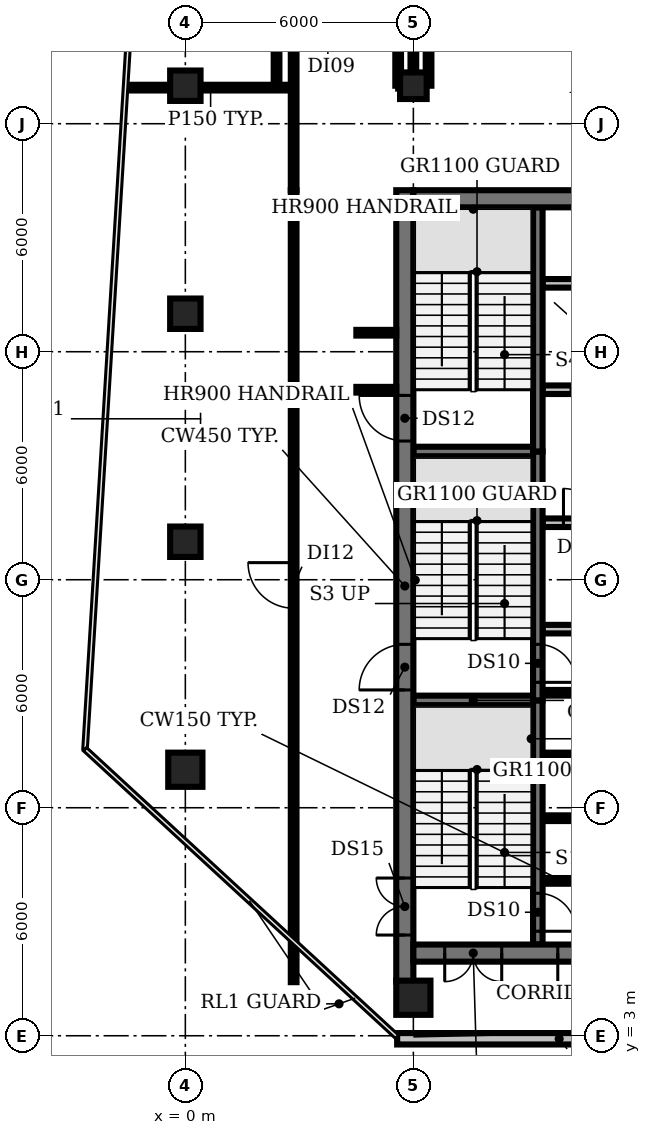
"""IFC4 building model, lengths in metres.
Left out: names, types, materials, properties, quantities, classifications, styles, units other than length and angle.
Written with IfcOpenShell. Run it as: python <this file> out.ifc"""

import sys

from ifc_helpers import new_model, si_unit, direction, frame, frame_2d, origin, origin_2d, place, context, subcontext, project, spatial, rectangle, circle, extrude, element, fill, save


model = new_model("IFC4")
c1 = context("Model", 3, precision=1e-05, world=origin(), true_north=direction((0.0, 1.0)))
c2 = subcontext(c1, "Body", "Model", "MODEL_VIEW")
j1 = project(units=[si_unit("LENGTHUNIT", "METRE"), si_unit("PLANEANGLEUNIT", "RADIAN")], contexts=[c1])
p1 = place(None, origin())
s1 = spatial("IfcSite", under=j1, at=p1, CompositionType="ELEMENT")
p2 = place(p1, origin())
s2 = spatial("IfcBuilding", under=s1, at=p2, CompositionType="ELEMENT")
p3 = place(p2, frame((0.0, 0.0, 243.2)))
s3 = spatial("IfcBuildingStorey", under=s2, at=p3, CompositionType="ELEMENT", Elevation=243.2)
p4 = place(p3, frame((0.0, 10.0, 0.0), z_axis=(0.0, 0.0, 1.0), x_axis=(1.0, 0.0, 0.0)))
e1 = element("IfcColumn", 1, at=p4, inside=s3, PredefinedType="COLUMN", context=c2, shape_type="SweptSolid", body=[
    extrude(circle(Radius=0.45, at=origin_2d()), origin(), (0.0, 0.0, 1.0), 3.85),
])
for number, where, z_axis, x_axis in (
    (2, (0.0, 16.0, 0.0), (0.0, 0.0, 1.0), (1.0, 0.0, 0.0)),
    (3, (0.0, 22.0, 0.0), (0.0, 0.0, 1.0), (1.0, 0.0, 0.0)),
    (4, (0.0, 28.0, 0.0), (0.0, 0.0, 1.0), (1.0, 0.0, 0.0)),
):
    element("IfcColumn", number, at=place(p3, frame(where, z_axis=z_axis, x_axis=x_axis)), inside=s3, PredefinedType="COLUMN", context=c2, shape_type="SweptSolid", body=[
        extrude(rectangle(XDim=0.8, YDim=0.8, at=origin_2d()), origin(), (0.0, 0.0, 1.0), 3.85),
    ])
p5 = place(p3, frame((6.0, 4.0, 0.0), z_axis=(0.0, 0.0, 1.0), x_axis=(1.0, 0.0, 0.0)))
e5 = element("IfcColumn", 5, at=p5, inside=s3, PredefinedType="COLUMN", context=c2, shape_type="SweptSolid", body=[
    extrude(circle(Radius=0.45, at=origin_2d()), origin(), (0.0, 0.0, 1.0), 3.85),
])
p6 = place(p3, frame((6.0, 28.0, 0.0), z_axis=(0.0, 0.0, 1.0), x_axis=(1.0, 0.0, 0.0)))
e6 = element("IfcColumn", 6, at=p6, inside=s3, PredefinedType="COLUMN", context=c2, shape_type="SweptSolid", body=[
    extrude(rectangle(XDim=0.7, YDim=0.7, at=origin_2d()), origin(), (0.0, 0.0, 1.0), 3.85),
])
p7 = place(p3, frame((5.573, 2.92, 0.0), z_axis=(0.0, 0.0, 1.0), x_axis=(1.0, 0.0, 0.0)))
e7 = element("IfcWall", 7, at=p7, inside=s3, PredefinedType="SOLIDWALL", context=c2, shape_type="SweptSolid", body=[
    extrude(rectangle(XDim=8.527, YDim=0.3, at=frame_2d((4.263, 0.0))), origin(), (0.0, 0.0, 1.0), 3.85),
])
for number, where, z_axis, x_axis in (
    (8, (9.4, 7.075, 0.0), (0.0, 0.0, 1.0), (1.0, 0.0, 0.0)),
    (9, (9.4, 8.725, 0.0), (0.0, 0.0, 1.0), (1.0, 0.0, 0.0)),
    (10, (9.4, 10.375, 0.0), (0.0, 0.0, 1.0), (1.0, 0.0, 0.0)),
):
    element("IfcWall", number, at=place(p3, frame(where, z_axis=z_axis, x_axis=x_axis)), inside=s3, PredefinedType="SHEAR", context=c2, shape_type="SweptSolid", body=[
        extrude(rectangle(XDim=1.05, YDim=0.15, at=frame_2d((0.525, 0.0))), origin(), (0.0, 0.0, 1.0), 3.85),
    ])
p8 = place(p3, frame((6.0, 11.825, 0.0), z_axis=(0.0, 0.0, 1.0), x_axis=(1.0, 0.0, 0.0)))
e11 = element("IfcWall", 11, at=p8, inside=s3, PredefinedType="SHEAR", context=c2, shape_type="SweptSolid", body=[
    extrude(rectangle(XDim=3.15, YDim=0.25, at=frame_2d((1.575, 0.0))), origin(), (0.0, 0.0, 1.0), 3.85),
])
p9 = place(p3, frame((9.4, 12.025, 0.0), z_axis=(0.0, 0.0, 1.0), x_axis=(1.0, 0.0, 0.0)))
e12 = element("IfcWall", 12, at=p9, inside=s3, PredefinedType="SHEAR", context=c2, shape_type="SweptSolid", body=[
    extrude(rectangle(XDim=1.05, YDim=0.15, at=frame_2d((0.525, 0.0))), origin(), (0.0, 0.0, 1.0), 3.85),
])
p10 = place(p3, frame((9.4, 13.7, 0.0), z_axis=(0.0, 0.0, 1.0), x_axis=(1.0, 0.0, 0.0)))
e13 = element("IfcWall", 13, at=p10, inside=s3, PredefinedType="PARTITIONING", context=c2, shape_type="SweptSolid", body=[
    extrude(rectangle(XDim=4.0, YDim=0.225, at=frame_2d((2.0, 0.0))), origin(), (0.0, 0.0, 1.0), 3.85),
])
p11 = place(p3, frame((9.4, 16.5, 0.0), z_axis=(0.0, 0.0, 1.0), x_axis=(1.0, 0.0, 0.0)))
e14 = element("IfcWall", 14, at=p11, inside=s3, PredefinedType="PARTITIONING", context=c2, shape_type="SweptSolid", body=[
    extrude(rectangle(XDim=14.6, YDim=0.225, at=frame_2d((7.3, 0.0))), origin(), (0.0, 0.0, 1.0), 3.85),
])
p12 = place(p11, frame((0.55, 0.0, 0.0)))
e15 = element("IfcOpeningElement", 15, at=p12, cuts=e14, PredefinedType="OPENING", context=c2, shape_type="SweptSolid", body=[
    extrude(rectangle(XDim=0.9, YDim=2.1, at=frame_2d((0.45, 1.05))), frame((0.0, 0.123, 0.0), z_axis=(0.0, -1.0, 0.0), x_axis=(1.0, 0.0, 0.0)), (0.0, 0.0, 1.0), 0.245),
])
p13 = place(p11, frame((6.075, 0.0, 0.0)))
e16 = element("IfcOpeningElement", 16, at=p13, cuts=e14, PredefinedType="OPENING", context=c2, shape_type="SweptSolid", body=[
    extrude(rectangle(XDim=1.0, YDim=2.1, at=frame_2d((0.5, 1.05))), frame((0.0, 0.123, 0.0), z_axis=(0.0, -1.0, 0.0), x_axis=(1.0, 0.0, 0.0)), (0.0, 0.0, 1.0), 0.245),
])
p14 = place(p11, frame((11.647, 0.0, 0.0)))
e17 = element("IfcOpeningElement", 17, at=p14, cuts=e14, PredefinedType="OPENING", context=c2, shape_type="SweptSolid", body=[
    extrude(rectangle(XDim=0.9, YDim=2.1, at=frame_2d((0.45, 1.05))), frame((0.0, 0.123, 0.0), z_axis=(0.0, -1.0, 0.0), x_axis=(1.0, 0.0, 0.0)), (0.0, 0.0, 1.0), 0.245),
])
p15 = place(p11, frame((13.423, 0.0, 0.0)))
e18 = element("IfcOpeningElement", 18, at=p15, cuts=e14, PredefinedType="OPENING", context=c2, shape_type="SweptSolid", body=[
    extrude(rectangle(XDim=0.9, YDim=2.1, at=frame_2d((0.45, 1.05))), frame((0.0, 0.123, 0.0), z_axis=(0.0, -1.0, 0.0), x_axis=(1.0, 0.0, 0.0)), (0.0, 0.0, 1.0), 0.245),
])
p16 = place(p3, frame((6.0, 18.375, 0.0), z_axis=(0.0, 0.0, 1.0), x_axis=(1.0, 0.0, 0.0)))
e19 = element("IfcWall", 19, at=p16, inside=s3, PredefinedType="SHEAR", context=c2, shape_type="SweptSolid", body=[
    extrude(rectangle(XDim=3.15, YDim=0.25, at=frame_2d((1.575, 0.0))), origin(), (0.0, 0.0, 1.0), 3.85),
])
p17 = place(p3, frame((24.0, 20.0, 0.0), z_axis=(0.0, 0.0, 1.0), x_axis=(-1.0, 0.0, 0.0)))
e20 = element("IfcWall", 20, at=p17, inside=s3, PredefinedType="PARTITIONING", context=c2, shape_type="SweptSolid", body=[
    extrude(rectangle(XDim=14.6, YDim=0.225, at=frame_2d((7.3, 0.0))), origin(), (0.0, 0.0, 1.0), 3.85),
])
p18 = place(p17, frame((12.75, 0.0, 0.0)))
e21 = element("IfcOpeningElement", 21, at=p18, cuts=e20, PredefinedType="OPENING", context=c2, shape_type="SweptSolid", body=[
    extrude(rectangle(XDim=1.1, YDim=2.1, at=frame_2d((0.55, 1.05))), frame((0.0, 0.123, 0.0), z_axis=(0.0, -1.0, 0.0), x_axis=(1.0, 0.0, 0.0)), (0.0, 0.0, 1.0), 0.245),
])
p19 = place(p17, frame((9.95, 0.0, 0.0)))
e22 = element("IfcOpeningElement", 22, at=p19, cuts=e20, PredefinedType="OPENING", context=c2, shape_type="SweptSolid", body=[
    extrude(rectangle(XDim=1.1, YDim=2.1, at=frame_2d((0.55, 1.05))), frame((0.0, 0.123, 0.0), z_axis=(0.0, -1.0, 0.0), x_axis=(1.0, 0.0, 0.0)), (0.0, 0.0, 1.0), 0.245),
])
p20 = place(p17, frame((7.15, 0.0, 0.0)))
e23 = element("IfcOpeningElement", 23, at=p20, cuts=e20, PredefinedType="OPENING", context=c2, shape_type="SweptSolid", body=[
    extrude(rectangle(XDim=1.1, YDim=2.1, at=frame_2d((0.55, 1.05))), frame((0.0, 0.123, 0.0), z_axis=(0.0, -1.0, 0.0), x_axis=(1.0, 0.0, 0.0)), (0.0, 0.0, 1.0), 0.245),
])
p21 = place(p17, frame((4.35, 0.0, 0.0)))
e24 = element("IfcOpeningElement", 24, at=p21, cuts=e20, PredefinedType="OPENING", context=c2, shape_type="SweptSolid", body=[
    extrude(rectangle(XDim=1.1, YDim=2.1, at=frame_2d((0.55, 1.05))), frame((0.0, 0.123, 0.0), z_axis=(0.0, -1.0, 0.0), x_axis=(1.0, 0.0, 0.0)), (0.0, 0.0, 1.0), 0.245),
])
p22 = place(p17, frame((2.137, 0.0, 0.0)))
e25 = element("IfcOpeningElement", 25, at=p22, cuts=e20, PredefinedType="OPENING", context=c2, shape_type="SweptSolid", body=[
    extrude(rectangle(XDim=0.9, YDim=2.1, at=frame_2d((0.45, 1.05))), frame((0.0, 0.123, 0.0), z_axis=(0.0, -1.0, 0.0), x_axis=(1.0, 0.0, 0.0)), (0.0, 0.0, 1.0), 0.245),
])
p23 = place(p17, frame((0.363, 0.0, 0.0)))
e26 = element("IfcOpeningElement", 26, at=p23, cuts=e20, PredefinedType="OPENING", context=c2, shape_type="SweptSolid", body=[
    extrude(rectangle(XDim=0.9, YDim=2.1, at=frame_2d((0.45, 1.05))), frame((0.0, 0.123, 0.0), z_axis=(0.0, -1.0, 0.0), x_axis=(1.0, 0.0, 0.0)), (0.0, 0.0, 1.0), 0.245),
])
p24 = place(p3, frame((9.4, 22.8, 0.0), z_axis=(0.0, 0.0, 1.0), x_axis=(1.0, 0.0, 0.0)))
e27 = element("IfcWall", 27, at=p24, inside=s3, PredefinedType="PARTITIONING", context=c2, shape_type="SweptSolid", body=[
    extrude(rectangle(XDim=14.6, YDim=0.225, at=frame_2d((7.3, 0.0))), origin(), (0.0, 0.0, 1.0), 3.85),
])
p25 = place(p3, frame((9.275, 11.825, 0.0), z_axis=(0.0, 0.0, 1.0), x_axis=(0.0, -1.0, 0.0)))
e28 = element("IfcWall", 28, at=p25, inside=s3, PredefinedType="SHEAR", context=c2, shape_type="SweptSolid", body=[
    extrude(rectangle(XDim=6.425, YDim=0.25, at=frame_2d((3.212, 0.0))), origin(), (0.0, 0.0, 1.0), 3.85),
])
p26 = place(p25, frame((5.075, 0.0, 0.0)))
e29 = element("IfcOpeningElement", 29, at=p26, cuts=e28, PredefinedType="OPENING", context=c2, shape_type="SweptSolid", body=[
    extrude(rectangle(XDim=1.0, YDim=2.1, at=frame_2d((0.5, 1.05))), frame((0.0, 0.135, 0.0), z_axis=(0.0, -1.0, 0.0), x_axis=(1.0, 0.0, 0.0)), (0.0, 0.0, 1.0), 0.27),
])
p27 = place(p3, frame((9.275, 18.375, 0.0), z_axis=(0.0, 0.0, 1.0), x_axis=(0.0, -1.0, 0.0)))
e30 = element("IfcWall", 30, at=p27, inside=s3, PredefinedType="SHEAR", context=c2, shape_type="SweptSolid", body=[
    extrude(rectangle(XDim=6.55, YDim=0.25, at=frame_2d((3.275, 0.0))), origin(), (0.0, 0.0, 1.0), 3.85),
])
p28 = place(p27, frame((5.075, 0.0, 0.0)))
e31 = element("IfcOpeningElement", 31, at=p28, cuts=e30, PredefinedType="OPENING", context=c2, shape_type="SweptSolid", body=[
    extrude(rectangle(XDim=1.0, YDim=2.1, at=frame_2d((0.5, 1.05))), frame((0.0, 0.135, 0.0), z_axis=(0.0, -1.0, 0.0), x_axis=(1.0, 0.0, 0.0)), (0.0, 0.0, 1.0), 0.27),
])
p29 = place(p3, frame((9.275, 18.375, 0.0), z_axis=(0.0, 0.0, 1.0), x_axis=(0.0, 1.0, 0.0)))
e32 = element("IfcWall", 32, at=p29, inside=s3, PredefinedType="SHEAR", context=c2, shape_type="SweptSolid", body=[
    extrude(rectangle(XDim=6.425, YDim=0.25, at=frame_2d((3.212, 0.0))), origin(), (0.0, 0.0, 1.0), 3.85),
])
p30 = place(p3, frame((5.775, 4.42, 0.0), z_axis=(0.0, 0.0, 1.0), x_axis=(0.0, 1.0, 0.0)))
e33 = element("IfcWall", 33, at=p30, inside=s3, PredefinedType="SHEAR", context=c2, shape_type="SweptSolid", body=[
    extrude(rectangle(XDim=20.83, YDim=0.45, at=frame_2d((10.415, 0.0))), origin(), (0.0, 0.0, 1.0), 3.85),
])
p31 = place(p30, frame((1.23, 0.0, 0.0)))
e34 = element("IfcOpeningElement", 34, at=p31, cuts=e33, PredefinedType="OPENING", context=c2, shape_type="SweptSolid", body=[
    extrude(rectangle(XDim=1.5, YDim=2.1, at=frame_2d((0.75, 1.05))), frame((0.0, 0.235, 0.0), z_axis=(0.0, -1.0, 0.0), x_axis=(1.0, 0.0, 0.0)), (0.0, 0.0, 1.0), 0.47),
])
p32 = place(p30, frame((7.68, 0.0, 0.0)))
e35 = element("IfcOpeningElement", 35, at=p32, cuts=e33, PredefinedType="OPENING", context=c2, shape_type="SweptSolid", body=[
    extrude(rectangle(XDim=1.2, YDim=2.1, at=frame_2d((0.6, 1.05))), frame((0.0, 0.235, 0.0), z_axis=(0.0, -1.0, 0.0), x_axis=(1.0, 0.0, 0.0)), (0.0, 0.0, 1.0), 0.47),
])
p33 = place(p30, frame((14.23, 0.0, 0.0)))
e36 = element("IfcOpeningElement", 36, at=p33, cuts=e33, PredefinedType="OPENING", context=c2, shape_type="SweptSolid", body=[
    extrude(rectangle(XDim=1.2, YDim=2.1, at=frame_2d((0.6, 1.05))), frame((0.0, 0.235, 0.0), z_axis=(0.0, -1.0, 0.0), x_axis=(1.0, 0.0, 0.0)), (0.0, 0.0, 1.0), 0.47),
])
p34 = place(p3, frame((24.0, 5.175, 0.0), z_axis=(0.0, 0.0, 1.0), x_axis=(-1.0, 0.0, 0.0)))
e37 = element("IfcWall", 37, at=p34, inside=s3, PredefinedType="SHEAR", context=c2, shape_type="SweptSolid", body=[
    extrude(rectangle(XDim=18.0, YDim=0.45, at=frame_2d((9.0, 0.0))), origin(), (0.0, 0.0, 1.0), 3.85),
])
p35 = place(p34, frame((0.825, 0.0, 0.0)))
e38 = element("IfcOpeningElement", 38, at=p35, cuts=e37, PredefinedType="OPENING", context=c2, shape_type="SweptSolid", body=[
    extrude(rectangle(XDim=1.5, YDim=2.1, at=frame_2d((0.75, 1.05))), frame((0.0, 0.235, 0.0), z_axis=(0.0, -1.0, 0.0), x_axis=(1.0, 0.0, 0.0)), (0.0, 0.0, 1.0), 0.47),
])
p36 = place(p34, frame((15.675, 0.0, 0.0)))
e39 = element("IfcOpeningElement", 39, at=p36, cuts=e37, PredefinedType="OPENING", context=c2, shape_type="SweptSolid", body=[
    extrude(rectangle(XDim=1.5, YDim=2.1, at=frame_2d((0.75, 1.05))), frame((0.0, 0.235, 0.0), z_axis=(0.0, -1.0, 0.0), x_axis=(1.0, 0.0, 0.0)), (0.0, 0.0, 1.0), 0.47),
])
p37 = place(p34, frame((13.0, 0.0, 0.0)))
e40 = element("IfcOpeningElement", 40, at=p37, cuts=e37, PredefinedType="OPENING", context=c2, shape_type="SweptSolid", body=[
    extrude(rectangle(XDim=1.2, YDim=2.1, at=frame_2d((0.6, 1.05))), frame((0.0, 0.235, 0.0), z_axis=(0.0, -1.0, 0.0), x_axis=(1.0, 0.0, 0.0)), (0.0, 0.0, 1.0), 0.47),
])
p38 = place(p34, frame((4.4, 0.0, 0.0)))
e41 = element("IfcOpeningElement", 41, at=p38, cuts=e37, PredefinedType="OPENING", context=c2, shape_type="SweptSolid", body=[
    extrude(rectangle(XDim=1.0, YDim=2.1, at=frame_2d((0.5, 1.05))), frame((0.0, 0.235, 0.0), z_axis=(0.0, -1.0, 0.0), x_axis=(1.0, 0.0, 0.0)), (0.0, 0.0, 1.0), 0.47),
])
p39 = place(p3, frame((6.0, 25.025, 0.0), z_axis=(0.0, 0.0, 1.0), x_axis=(1.0, 0.0, 0.0)))
e42 = element("IfcWall", 42, at=p39, inside=s3, PredefinedType="SHEAR", context=c2, shape_type="SweptSolid", body=[
    extrude(rectangle(XDim=18.0, YDim=0.45, at=frame_2d((9.0, 0.0))), origin(), (0.0, 0.0, 1.0), 3.85),
])
p40 = place(p3, frame((-1.52, 27.95, 0.0), z_axis=(0.0, 0.0, 1.0), x_axis=(1.0, 0.0, 0.0)))
e43 = element("IfcWall", 43, at=p40, inside=s3, PredefinedType="PARTITIONING", context=c2, shape_type="SweptSolid", body=[
    extrude(rectangle(XDim=4.37, YDim=0.15, at=frame_2d((2.185, 0.0))), origin(), (0.0, 0.0, 1.0), 2.88),
])
p41 = place(p3, frame((2.4, 27.95, 0.0), z_axis=(0.0, 0.0, 1.0), x_axis=(0.0, 1.0, 0.0)))
e44 = element("IfcWall", 44, at=p41, inside=s3, PredefinedType="PARTITIONING", context=c2, shape_type="SweptSolid", body=[
    extrude(rectangle(XDim=6.0, YDim=0.15, at=frame_2d((3.0, 0.0))), origin(), (0.0, 0.0, 1.0), 2.88),
])
p42 = place(p3, frame((2.85, 4.41, 0.0), z_axis=(0.0, 0.0, 1.0), x_axis=(0.0, 1.0, 0.0)))
e45 = element("IfcWall", 45, at=p42, inside=s3, PredefinedType="PARTITIONING", context=c2, shape_type="SweptSolid", body=[
    extrude(rectangle(XDim=20.84, YDim=0.15, at=frame_2d((10.42, 0.0))), origin(), (0.0, 0.0, 1.0), 2.88),
])
p43 = place(p42, frame((9.84, 0.0, 0.0)))
e46 = element("IfcOpeningElement", 46, at=p43, cuts=e45, PredefinedType="OPENING", context=c2, shape_type="SweptSolid", body=[
    extrude(rectangle(XDim=1.2, YDim=2.1, at=frame_2d((0.6, 1.05))), frame((0.0, 0.085, 0.0), z_axis=(0.0, -1.0, 0.0), x_axis=(1.0, 0.0, 0.0)), (0.0, 0.0, 1.0), 0.17),
])
p44 = place(p3, frame((2.85, 25.25, 0.0), z_axis=(0.0, 0.0, 1.0), x_axis=(0.0, 1.0, 0.0)))
e47 = element("IfcWall", 47, at=p44, inside=s3, PredefinedType="PARTITIONING", context=c2, shape_type="SweptSolid", body=[
    extrude(rectangle(XDim=3.9, YDim=0.15, at=frame_2d((1.95, 0.0))), origin(), (0.0, 0.0, 1.0), 2.88),
])
for number, where, z_axis, x_axis in (
    (48, (4.5, 20.0, 0.0), (0.0, 0.0, 1.0), (1.0, 0.0, 0.0)),
    (49, (4.5, 21.5, 0.0), (0.0, 0.0, 1.0), (1.0, 0.0, 0.0)),
):
    element("IfcWall", number, at=place(p3, frame(where, z_axis=z_axis, x_axis=x_axis)), inside=s3, PredefinedType="PARTITIONING", context=c2, shape_type="SweptSolid", body=[
        extrude(rectangle(XDim=1.05, YDim=0.15, at=frame_2d((0.525, 0.0))), origin(), (0.0, 0.0, 1.0), 2.88),
    ])
p45 = place(p3, frame((5.6, 28.0, 0.0), z_axis=(0.0, 0.0, 1.0), x_axis=(0.0, 1.0, 0.0)))
e50 = element("IfcWall", 50, at=p45, inside=s3, PredefinedType="PARTITIONING", context=c2, shape_type="SweptSolid", body=[
    extrude(rectangle(XDim=1.15, YDim=0.15, at=frame_2d((0.575, 0.0))), origin(), (0.0, 0.0, 1.0), 2.88),
])
p46 = place(p3, frame((5.6, 28.0, 0.0), z_axis=(0.0, 0.0, 1.0), x_axis=(1.0, 0.0, 0.0)))
e51 = element("IfcWall", 51, at=p46, inside=s3, PredefinedType="PARTITIONING", context=c2, shape_type="SweptSolid", body=[
    extrude(rectangle(XDim=0.4, YDim=0.15, at=frame_2d((0.2, 0.0))), origin(), (0.0, 0.0, 1.0), 2.88),
])
p47 = place(p3, frame((6.0, 28.0, 0.0), z_axis=(0.0, 0.0, 1.0), x_axis=(0.0, 1.0, 0.0)))
e52 = element("IfcWall", 52, at=p47, inside=s3, PredefinedType="PARTITIONING", context=c2, shape_type="SweptSolid", body=[
    extrude(rectangle(XDim=5.95, YDim=0.15, at=frame_2d((2.975, 0.0))), origin(), (0.0, 0.0, 1.0), 2.88),
])
p48 = place(p3, frame((6.4, 28.0, 0.0), z_axis=(0.0, 0.0, 1.0), x_axis=(0.0, 1.0, 0.0)))
e53 = element("IfcWall", 53, at=p48, inside=s3, PredefinedType="PARTITIONING", context=c2, shape_type="SweptSolid", body=[
    extrude(rectangle(XDim=1.15, YDim=0.15, at=frame_2d((0.575, 0.0))), origin(), (0.0, 0.0, 1.0), 2.88),
])
p49 = place(p12, origin())
e54 = element("IfcDoor", 54, at=p49, inside=s3, OperationType="SINGLE_SWING_LEFT", PredefinedType="DOOR", context=c2, shape_type="SweptSolid", body=[
    extrude(rectangle(XDim=0.9, YDim=2.1, at=frame_2d((0.45, 1.05))), frame((0.0, 0.025, 0.0), z_axis=(0.0, -1.0, 0.0), x_axis=(1.0, 0.0, 0.0)), (0.0, 0.0, 1.0), 0.05),
])
fill(e15, e54)
p50 = place(p26, origin())
e55 = element("IfcDoor", 55, at=p50, inside=s3, OperationType="SINGLE_SWING_RIGHT", PredefinedType="DOOR", context=c2, shape_type="SweptSolid", body=[
    extrude(rectangle(XDim=1.0, YDim=2.1, at=frame_2d((0.5, 1.05))), frame((0.0, 0.025, 0.0), z_axis=(0.0, -1.0, 0.0), x_axis=(1.0, 0.0, 0.0)), (0.0, 0.0, 1.0), 0.05),
])
fill(e29, e55)
p51 = place(p28, origin())
e56 = element("IfcDoor", 56, at=p51, inside=s3, OperationType="SINGLE_SWING_RIGHT", PredefinedType="DOOR", context=c2, shape_type="SweptSolid", body=[
    extrude(rectangle(XDim=1.0, YDim=2.1, at=frame_2d((0.5, 1.05))), frame((0.0, 0.025, 0.0), z_axis=(0.0, -1.0, 0.0), x_axis=(1.0, 0.0, 0.0)), (0.0, 0.0, 1.0), 0.05),
])
fill(e31, e56)
p52 = place(p31, origin())
e57 = element("IfcDoor", 57, at=p52, inside=s3, OperationType="DOUBLE_DOOR_SINGLE_SWING", PredefinedType="DOOR", context=c2, shape_type="SweptSolid", body=[
    extrude(rectangle(XDim=1.5, YDim=2.1, at=frame_2d((0.75, 1.05))), frame((0.0, 0.025, 0.0), z_axis=(0.0, -1.0, 0.0), x_axis=(1.0, 0.0, 0.0)), (0.0, 0.0, 1.0), 0.05),
])
fill(e34, e57)
p53 = place(p32, origin())
e58 = element("IfcDoor", 58, at=p53, inside=s3, OperationType="SINGLE_SWING_LEFT", PredefinedType="DOOR", context=c2, shape_type="SweptSolid", body=[
    extrude(rectangle(XDim=1.2, YDim=2.1, at=frame_2d((0.6, 1.05))), frame((0.0, 0.025, 0.0), z_axis=(0.0, -1.0, 0.0), x_axis=(1.0, 0.0, 0.0)), (0.0, 0.0, 1.0), 0.05),
])
fill(e35, e58)
p54 = place(p33, origin())
e59 = element("IfcDoor", 59, at=p54, inside=s3, OperationType="SINGLE_SWING_RIGHT", PredefinedType="DOOR", context=c2, shape_type="SweptSolid", body=[
    extrude(rectangle(XDim=1.2, YDim=2.1, at=frame_2d((0.6, 1.05))), frame((0.0, 0.025, 0.0), z_axis=(0.0, -1.0, 0.0), x_axis=(1.0, 0.0, 0.0)), (0.0, 0.0, 1.0), 0.05),
])
fill(e36, e59)
p55 = place(p36, origin())
e60 = element("IfcDoor", 60, at=p55, inside=s3, OperationType="DOUBLE_DOOR_SINGLE_SWING", PredefinedType="DOOR", context=c2, shape_type="SweptSolid", body=[
    extrude(rectangle(XDim=1.5, YDim=2.1, at=frame_2d((0.75, 1.05))), frame((0.0, 0.025, 0.0), z_axis=(0.0, -1.0, 0.0), x_axis=(1.0, 0.0, 0.0)), (0.0, 0.0, 1.0), 0.05),
])
fill(e39, e60)
p56 = place(p37, origin())
e61 = element("IfcDoor", 61, at=p56, inside=s3, OperationType="SINGLE_SWING_RIGHT", PredefinedType="DOOR", context=c2, shape_type="SweptSolid", body=[
    extrude(rectangle(XDim=1.2, YDim=2.1, at=frame_2d((0.6, 1.05))), frame((0.0, 0.025, 0.0), z_axis=(0.0, -1.0, 0.0), x_axis=(1.0, 0.0, 0.0)), (0.0, 0.0, 1.0), 0.05),
])
fill(e40, e61)
p57 = place(p43, origin())
e62 = element("IfcDoor", 62, at=p57, inside=s3, OperationType="SINGLE_SWING_RIGHT", PredefinedType="DOOR", context=c2, shape_type="SweptSolid", body=[
    extrude(rectangle(XDim=1.2, YDim=2.1, at=frame_2d((0.6, 1.05))), frame((0.0, 0.025, 0.0), z_axis=(0.0, -1.0, 0.0), x_axis=(1.0, 0.0, 0.0)), (0.0, 0.0, 1.0), 0.05),
])
fill(e46, e62)
save(model, sys.argv[1])
